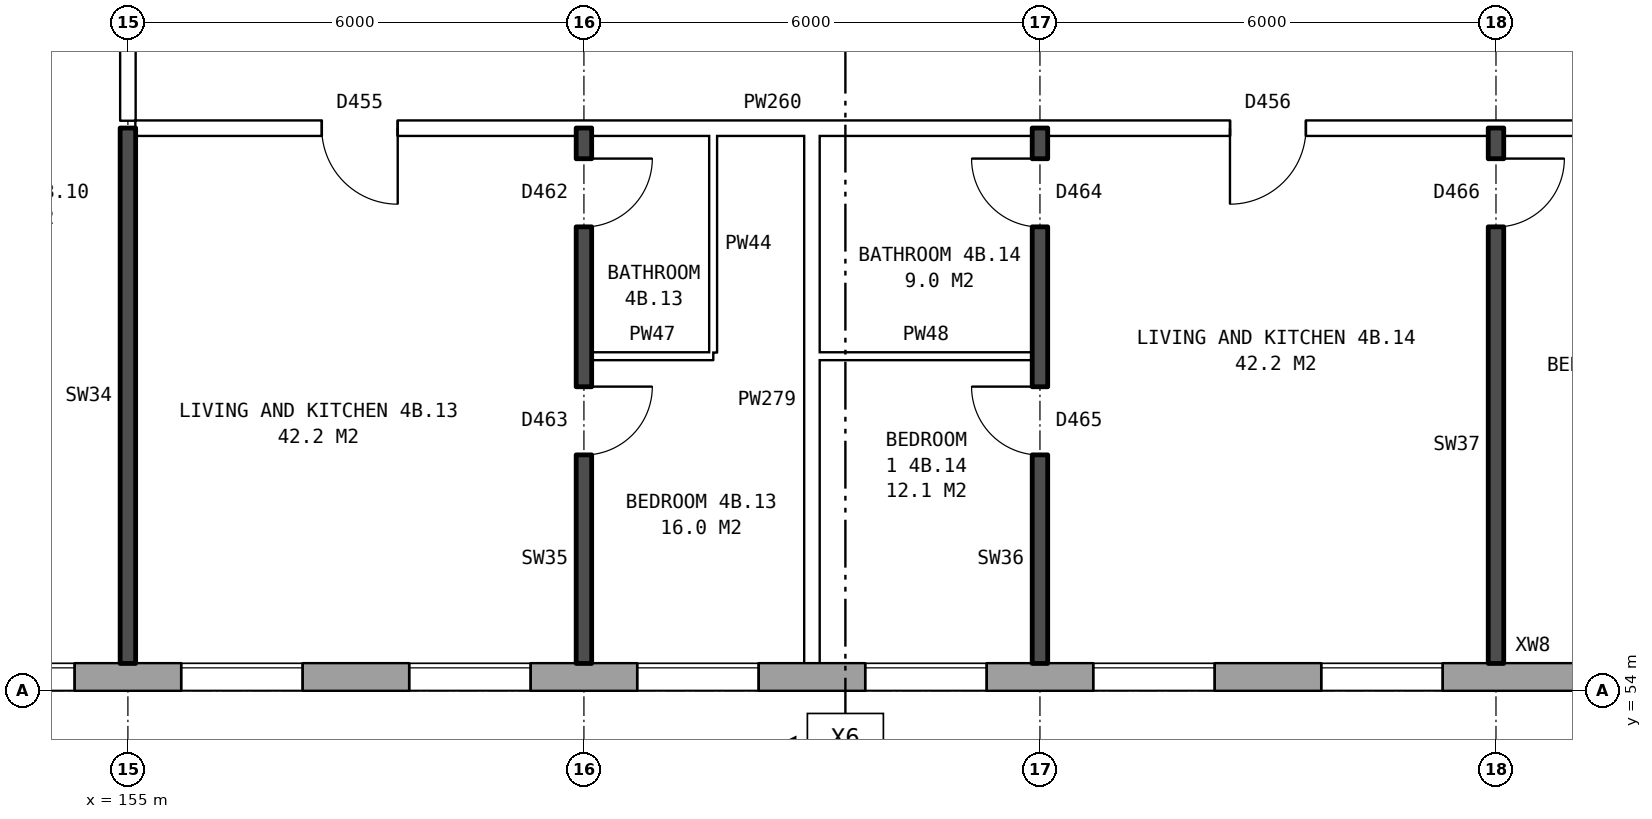
"""IFC4 building model, lengths in metres.
Left out: names, types, materials, properties, quantities, classifications, styles, units other than length and angle.
Written with IfcOpenShell. Run it as: python <this file> out.ifc"""

import sys

from ifc_helpers import new_model, si_unit, direction, frame, frame_2d, origin, place, context, subcontext, project, spatial, rectangle, extrude, element, fill, save


model = new_model("IFC4")
c1 = context("Model", 3, precision=1e-05, world=origin(), true_north=direction((0.0, 1.0)))
c2 = subcontext(c1, "Body", "Model", "MODEL_VIEW")
j1 = project(units=[si_unit("LENGTHUNIT", "METRE"), si_unit("PLANEANGLEUNIT", "RADIAN")], contexts=[c1])
p1 = place(None, origin())
s1 = spatial("IfcSite", under=j1, at=p1, CompositionType="ELEMENT")
p2 = place(p1, origin())
s2 = spatial("IfcBuilding", under=s1, at=p2, CompositionType="ELEMENT")
p3 = place(p2, frame((0.0, 0.0, 19.5)))
s3 = spatial("IfcBuildingStorey", under=s2, at=p3, CompositionType="ELEMENT", Elevation=19.5)
p4 = place(p3, frame((134.075, 54.18, 0.0), z_axis=(0.0, 0.0, 1.0), x_axis=(1.0, 0.0, 0.0)))
e1 = element("IfcWall", 1, at=p4, inside=s3, PredefinedType="STANDARD", context=c2, shape_type="SweptSolid", body=[
    extrude(rectangle(XDim=40.601, YDim=0.36, at=frame_2d((20.3, 0.0))), origin(), (0.0, 0.0, 1.0), 2.85),
])
p5 = place(p4, frame((0.3, 0.0, 0.8)))
e2 = element("IfcOpeningElement", 2, at=p5, cuts=e1, PredefinedType="OPENING", context=c2, shape_type="SweptSolid", body=[
    extrude(rectangle(XDim=0.8, YDim=0.9, at=frame_2d((0.4, 0.45))), frame((0.0, 0.19, 0.0), z_axis=(0.0, -1.0, 0.0), x_axis=(1.0, 0.0, 0.0)), (0.0, 0.0, 1.0), 0.38),
])
p6 = place(p4, frame((3.625, 0.0, 0.8)))
e3 = element("IfcOpeningElement", 3, at=p6, cuts=e1, PredefinedType="OPENING", context=c2, shape_type="SweptSolid", body=[
    extrude(rectangle(XDim=1.6, YDim=1.8, at=frame_2d((0.8, 0.9))), frame((0.0, 0.19, 0.0), z_axis=(0.0, -1.0, 0.0), x_axis=(1.0, 0.0, 0.0)), (0.0, 0.0, 1.0), 0.38),
])
p7 = place(p4, frame((6.625, 0.0, 0.8)))
e4 = element("IfcOpeningElement", 4, at=p7, cuts=e1, PredefinedType="OPENING", context=c2, shape_type="SweptSolid", body=[
    extrude(rectangle(XDim=1.6, YDim=1.8, at=frame_2d((0.8, 0.9))), frame((0.0, 0.19, 0.0), z_axis=(0.0, -1.0, 0.0), x_axis=(1.0, 0.0, 0.0)), (0.0, 0.0, 1.0), 0.38),
])
p8 = place(p4, frame((9.625, 0.0, 0.8)))
e5 = element("IfcOpeningElement", 5, at=p8, cuts=e1, PredefinedType="OPENING", context=c2, shape_type="SweptSolid", body=[
    extrude(rectangle(XDim=1.6, YDim=1.8, at=frame_2d((0.8, 0.9))), frame((0.0, 0.19, 0.0), z_axis=(0.0, -1.0, 0.0), x_axis=(1.0, 0.0, 0.0)), (0.0, 0.0, 1.0), 0.38),
])
p9 = place(p4, frame((12.625, 0.0, 0.8)))
e6 = element("IfcOpeningElement", 6, at=p9, cuts=e1, PredefinedType="OPENING", context=c2, shape_type="SweptSolid", body=[
    extrude(rectangle(XDim=1.6, YDim=1.8, at=frame_2d((0.8, 0.9))), frame((0.0, 0.19, 0.0), z_axis=(0.0, -1.0, 0.0), x_axis=(1.0, 0.0, 0.0)), (0.0, 0.0, 1.0), 0.38),
])
p10 = place(p4, frame((15.625, 0.0, 0.8)))
e7 = element("IfcOpeningElement", 7, at=p10, cuts=e1, PredefinedType="OPENING", context=c2, shape_type="SweptSolid", body=[
    extrude(rectangle(XDim=1.6, YDim=1.8, at=frame_2d((0.8, 0.9))), frame((0.0, 0.19, 0.0), z_axis=(0.0, -1.0, 0.0), x_axis=(1.0, 0.0, 0.0)), (0.0, 0.0, 1.0), 0.38),
])
p11 = place(p4, frame((18.625, 0.0, 0.8)))
e8 = element("IfcOpeningElement", 8, at=p11, cuts=e1, PredefinedType="OPENING", context=c2, shape_type="SweptSolid", body=[
    extrude(rectangle(XDim=1.6, YDim=1.8, at=frame_2d((0.8, 0.9))), frame((0.0, 0.19, 0.0), z_axis=(0.0, -1.0, 0.0), x_axis=(1.0, 0.0, 0.0)), (0.0, 0.0, 1.0), 0.38),
])
p12 = place(p4, frame((21.625, 0.0, 0.8)))
e9 = element("IfcOpeningElement", 9, at=p12, cuts=e1, PredefinedType="OPENING", context=c2, shape_type="SweptSolid", body=[
    extrude(rectangle(XDim=1.6, YDim=1.8, at=frame_2d((0.8, 0.9))), frame((0.0, 0.19, 0.0), z_axis=(0.0, -1.0, 0.0), x_axis=(1.0, 0.0, 0.0)), (0.0, 0.0, 1.0), 0.38),
])
p13 = place(p4, frame((24.625, 0.0, 0.8)))
e10 = element("IfcOpeningElement", 10, at=p13, cuts=e1, PredefinedType="OPENING", context=c2, shape_type="SweptSolid", body=[
    extrude(rectangle(XDim=1.6, YDim=1.8, at=frame_2d((0.8, 0.9))), frame((0.0, 0.19, 0.0), z_axis=(0.0, -1.0, 0.0), x_axis=(1.0, 0.0, 0.0)), (0.0, 0.0, 1.0), 0.38),
])
p14 = place(p4, frame((27.625, 0.0, 0.8)))
e11 = element("IfcOpeningElement", 11, at=p14, cuts=e1, PredefinedType="OPENING", context=c2, shape_type="SweptSolid", body=[
    extrude(rectangle(XDim=1.6, YDim=1.8, at=frame_2d((0.8, 0.9))), frame((0.0, 0.19, 0.0), z_axis=(0.0, -1.0, 0.0), x_axis=(1.0, 0.0, 0.0)), (0.0, 0.0, 1.0), 0.38),
])
p15 = place(p4, frame((30.625, 0.0, 0.8)))
e12 = element("IfcOpeningElement", 12, at=p15, cuts=e1, PredefinedType="OPENING", context=c2, shape_type="SweptSolid", body=[
    extrude(rectangle(XDim=1.6, YDim=1.8, at=frame_2d((0.8, 0.9))), frame((0.0, 0.19, 0.0), z_axis=(0.0, -1.0, 0.0), x_axis=(1.0, 0.0, 0.0)), (0.0, 0.0, 1.0), 0.38),
])
p16 = place(p4, frame((33.625, 0.0, 0.8)))
e13 = element("IfcOpeningElement", 13, at=p16, cuts=e1, PredefinedType="OPENING", context=c2, shape_type="SweptSolid", body=[
    extrude(rectangle(XDim=1.6, YDim=1.8, at=frame_2d((0.8, 0.9))), frame((0.0, 0.19, 0.0), z_axis=(0.0, -1.0, 0.0), x_axis=(1.0, 0.0, 0.0)), (0.0, 0.0, 1.0), 0.38),
])
p17 = place(p4, frame((36.625, 0.0, 0.8)))
e14 = element("IfcOpeningElement", 14, at=p17, cuts=e1, PredefinedType="OPENING", context=c2, shape_type="SweptSolid", body=[
    extrude(rectangle(XDim=1.6, YDim=1.8, at=frame_2d((0.8, 0.9))), frame((0.0, 0.19, 0.0), z_axis=(0.0, -1.0, 0.0), x_axis=(1.0, 0.0, 0.0)), (0.0, 0.0, 1.0), 0.38),
])
p18 = place(p4, frame((1.4, 0.0, 0.8)))
e15 = element("IfcOpeningElement", 15, at=p18, cuts=e1, PredefinedType="OPENING", context=c2, shape_type="SweptSolid", body=[
    extrude(rectangle(XDim=1.2, YDim=1.8, at=frame_2d((0.6, 0.9))), frame((0.0, 0.19, 0.0), z_axis=(0.0, -1.0, 0.0), x_axis=(1.0, 0.0, 0.0)), (0.0, 0.0, 1.0), 0.38),
])
p19 = place(p3, frame((161.1, 58.4, 0.0), z_axis=(0.0, 0.0, 1.0), x_axis=(1.0, 0.0, 0.0)))
e16 = element("IfcWall", 16, at=p19, inside=s3, PredefinedType="PARTITIONING", context=c2, shape_type="SweptSolid", body=[
    extrude(rectangle(XDim=1.6, YDim=0.1, at=frame_2d((0.8, 0.0))), origin(), (0.0, 0.0, 1.0), 2.85),
])
p20 = place(p3, frame((164.1, 58.4, 0.0), z_axis=(0.0, 0.0, 1.0), x_axis=(1.0, 0.0, 0.0)))
e17 = element("IfcWall", 17, at=p20, inside=s3, PredefinedType="PARTITIONING", context=c2, shape_type="SweptSolid", body=[
    extrude(rectangle(XDim=2.8, YDim=0.1, at=frame_2d((1.4, 0.0))), origin(), (0.0, 0.0, 1.0), 2.85),
])
p21 = place(p3, frame((155.1, 61.4, 0.0), z_axis=(0.0, 0.0, 1.0), x_axis=(1.0, 0.0, 0.0)))
e18 = element("IfcWall", 18, at=p21, inside=s3, PredefinedType="PARTITIONING", context=c2, shape_type="SweptSolid", body=[
    extrude(rectangle(XDim=22.29, YDim=0.2, at=frame_2d((11.145, 0.0))), origin(), (0.0, 0.0, 1.0), 2.85),
])
p22 = place(p21, frame((2.45, 0.0, 0.0)))
e19 = element("IfcOpeningElement", 19, at=p22, cuts=e18, PredefinedType="OPENING", context=c2, shape_type="SweptSolid", body=[
    extrude(rectangle(XDim=1.0, YDim=2.1, at=frame_2d((0.5, 1.05))), frame((0.0, 0.11, 0.0), z_axis=(0.0, -1.0, 0.0), x_axis=(1.0, 0.0, 0.0)), (0.0, 0.0, 1.0), 0.22),
])
p23 = place(p21, frame((14.4, 0.0, 0.0)))
e20 = element("IfcOpeningElement", 20, at=p23, cuts=e18, PredefinedType="OPENING", context=c2, shape_type="SweptSolid", body=[
    extrude(rectangle(XDim=1.0, YDim=2.1, at=frame_2d((0.5, 1.05))), frame((0.0, 0.11, 0.0), z_axis=(0.0, -1.0, 0.0), x_axis=(1.0, 0.0, 0.0)), (0.0, 0.0, 1.0), 0.22),
])
p24 = place(p3, frame((155.0, 54.36, 0.0), z_axis=(0.0, 0.0, 1.0), x_axis=(0.0, 1.0, 0.0)))
e21 = element("IfcWall", 21, at=p24, inside=s3, PredefinedType="SOLIDWALL", context=c2, shape_type="SweptSolid", body=[
    extrude(rectangle(XDim=7.04, YDim=0.2, at=frame_2d((3.52, 0.0))), origin(), (0.0, 0.0, 1.0), 2.85),
])
p25 = place(p3, frame((155.0, 61.5, 0.0), z_axis=(0.0, 0.0, 1.0), x_axis=(0.0, 1.0, 0.0)))
e22 = element("IfcWall", 22, at=p25, inside=s3, PredefinedType="PARTITIONING", context=c2, shape_type="SweptSolid", body=[
    extrude(rectangle(XDim=2.2, YDim=0.2, at=frame_2d((1.1, 0.0))), origin(), (0.0, 0.0, 1.0), 2.85),
])
p26 = place(p3, frame((161.0, 54.36, 0.0), z_axis=(0.0, 0.0, 1.0), x_axis=(0.0, 1.0, 0.0)))
e23 = element("IfcWall", 23, at=p26, inside=s3, PredefinedType="SOLIDWALL", context=c2, shape_type="SweptSolid", body=[
    extrude(rectangle(XDim=7.04, YDim=0.2, at=frame_2d((3.52, 0.0))), origin(), (0.0, 0.0, 1.0), 2.85),
])
p27 = place(p26, frame((2.74, 0.0, 0.0)))
e24 = element("IfcOpeningElement", 24, at=p27, cuts=e23, PredefinedType="OPENING", context=c2, shape_type="SweptSolid", body=[
    extrude(rectangle(XDim=0.9, YDim=2.1, at=frame_2d((0.45, 1.05))), frame((0.0, 0.11, 0.0), z_axis=(0.0, -1.0, 0.0), x_axis=(1.0, 0.0, 0.0)), (0.0, 0.0, 1.0), 0.22),
])
p28 = place(p26, frame((5.74, 0.0, 0.0)))
e25 = element("IfcOpeningElement", 25, at=p28, cuts=e23, PredefinedType="OPENING", context=c2, shape_type="SweptSolid", body=[
    extrude(rectangle(XDim=0.9, YDim=2.1, at=frame_2d((0.45, 1.05))), frame((0.0, 0.11, 0.0), z_axis=(0.0, -1.0, 0.0), x_axis=(1.0, 0.0, 0.0)), (0.0, 0.0, 1.0), 0.22),
])
p29 = place(p3, frame((162.7, 58.45, 0.0), z_axis=(0.0, 0.0, 1.0), x_axis=(0.0, 1.0, 0.0)))
e26 = element("IfcWall", 26, at=p29, inside=s3, PredefinedType="PARTITIONING", context=c2, shape_type="SweptSolid", body=[
    extrude(rectangle(XDim=2.85, YDim=0.1, at=frame_2d((1.425, 0.0))), origin(), (0.0, 0.0, 1.0), 2.85),
])
p30 = place(p3, frame((164.0, 54.36, 0.0), z_axis=(0.0, 0.0, 1.0), x_axis=(0.0, 1.0, 0.0)))
e27 = element("IfcWall", 27, at=p30, inside=s3, PredefinedType="PARTITIONING", context=c2, shape_type="SweptSolid", body=[
    extrude(rectangle(XDim=6.94, YDim=0.2, at=frame_2d((3.47, 0.0))), origin(), (0.0, 0.0, 1.0), 2.85),
])
p31 = place(p3, frame((167.0, 54.36, 0.0), z_axis=(0.0, 0.0, 1.0), x_axis=(0.0, 1.0, 0.0)))
e28 = element("IfcWall", 28, at=p31, inside=s3, PredefinedType="SOLIDWALL", context=c2, shape_type="SweptSolid", body=[
    extrude(rectangle(XDim=7.04, YDim=0.2, at=frame_2d((3.52, 0.0))), origin(), (0.0, 0.0, 1.0), 2.85),
])
p32 = place(p31, frame((2.74, 0.0, 0.0)))
e29 = element("IfcOpeningElement", 29, at=p32, cuts=e28, PredefinedType="OPENING", context=c2, shape_type="SweptSolid", body=[
    extrude(rectangle(XDim=0.9, YDim=2.1, at=frame_2d((0.45, 1.05))), frame((0.0, 0.11, 0.0), z_axis=(0.0, -1.0, 0.0), x_axis=(1.0, 0.0, 0.0)), (0.0, 0.0, 1.0), 0.22),
])
p33 = place(p31, frame((5.74, 0.0, 0.0)))
e30 = element("IfcOpeningElement", 30, at=p33, cuts=e28, PredefinedType="OPENING", context=c2, shape_type="SweptSolid", body=[
    extrude(rectangle(XDim=0.9, YDim=2.1, at=frame_2d((0.45, 1.05))), frame((0.0, 0.11, 0.0), z_axis=(0.0, -1.0, 0.0), x_axis=(1.0, 0.0, 0.0)), (0.0, 0.0, 1.0), 0.22),
])
p34 = place(p3, frame((173.0, 54.36, 0.0), z_axis=(0.0, 0.0, 1.0), x_axis=(0.0, 1.0, 0.0)))
e31 = element("IfcWall", 31, at=p34, inside=s3, PredefinedType="SOLIDWALL", context=c2, shape_type="SweptSolid", body=[
    extrude(rectangle(XDim=7.04, YDim=0.2, at=frame_2d((3.52, 0.0))), origin(), (0.0, 0.0, 1.0), 2.85),
])
p35 = place(p34, frame((5.74, 0.0, 0.0)))
e32 = element("IfcOpeningElement", 32, at=p35, cuts=e31, PredefinedType="OPENING", context=c2, shape_type="SweptSolid", body=[
    extrude(rectangle(XDim=0.9, YDim=2.1, at=frame_2d((0.45, 1.05))), frame((0.0, 0.11, 0.0), z_axis=(0.0, -1.0, 0.0), x_axis=(1.0, 0.0, 0.0)), (0.0, 0.0, 1.0), 0.22),
])
p36 = place(p11, origin())
e33 = element("IfcWindow", 33, at=p36, inside=s3, PartitioningType="SINGLE_PANEL", PredefinedType="WINDOW", context=c2, shape_type="SweptSolid", body=[
    extrude(rectangle(XDim=1.6, YDim=1.8, at=frame_2d((0.8, 0.9))), frame((0.0, 0.15, 0.0), z_axis=(0.0, -1.0, 0.0), x_axis=(1.0, 0.0, 0.0)), (0.0, 0.0, 1.0), 0.06),
])
fill(e8, e33)
p37 = place(p12, origin())
e34 = element("IfcWindow", 34, at=p37, inside=s3, PartitioningType="SINGLE_PANEL", PredefinedType="WINDOW", context=c2, shape_type="SweptSolid", body=[
    extrude(rectangle(XDim=1.6, YDim=1.8, at=frame_2d((0.8, 0.9))), frame((0.0, 0.15, 0.0), z_axis=(0.0, -1.0, 0.0), x_axis=(1.0, 0.0, 0.0)), (0.0, 0.0, 1.0), 0.06),
])
fill(e9, e34)
p38 = place(p13, origin())
e35 = element("IfcWindow", 35, at=p38, inside=s3, PartitioningType="SINGLE_PANEL", PredefinedType="WINDOW", context=c2, shape_type="SweptSolid", body=[
    extrude(rectangle(XDim=1.6, YDim=1.8, at=frame_2d((0.8, 0.9))), frame((0.0, 0.15, 0.0), z_axis=(0.0, -1.0, 0.0), x_axis=(1.0, 0.0, 0.0)), (0.0, 0.0, 1.0), 0.06),
])
fill(e10, e35)
p39 = place(p14, origin())
e36 = element("IfcWindow", 36, at=p39, inside=s3, PartitioningType="SINGLE_PANEL", PredefinedType="WINDOW", context=c2, shape_type="SweptSolid", body=[
    extrude(rectangle(XDim=1.6, YDim=1.8, at=frame_2d((0.8, 0.9))), frame((0.0, 0.15, 0.0), z_axis=(0.0, -1.0, 0.0), x_axis=(1.0, 0.0, 0.0)), (0.0, 0.0, 1.0), 0.06),
])
fill(e11, e36)
p40 = place(p15, origin())
e37 = element("IfcWindow", 37, at=p40, inside=s3, PartitioningType="SINGLE_PANEL", PredefinedType="WINDOW", context=c2, shape_type="SweptSolid", body=[
    extrude(rectangle(XDim=1.6, YDim=1.8, at=frame_2d((0.8, 0.9))), frame((0.0, 0.15, 0.0), z_axis=(0.0, -1.0, 0.0), x_axis=(1.0, 0.0, 0.0)), (0.0, 0.0, 1.0), 0.06),
])
fill(e12, e37)
p41 = place(p16, origin())
e38 = element("IfcWindow", 38, at=p41, inside=s3, PartitioningType="SINGLE_PANEL", PredefinedType="WINDOW", context=c2, shape_type="SweptSolid", body=[
    extrude(rectangle(XDim=1.6, YDim=1.8, at=frame_2d((0.8, 0.9))), frame((0.0, 0.15, 0.0), z_axis=(0.0, -1.0, 0.0), x_axis=(1.0, 0.0, 0.0)), (0.0, 0.0, 1.0), 0.06),
])
fill(e13, e38)
p42 = place(p17, origin())
e39 = element("IfcWindow", 39, at=p42, inside=s3, PartitioningType="SINGLE_PANEL", PredefinedType="WINDOW", context=c2, shape_type="SweptSolid", body=[
    extrude(rectangle(XDim=1.6, YDim=1.8, at=frame_2d((0.8, 0.9))), frame((0.0, 0.15, 0.0), z_axis=(0.0, -1.0, 0.0), x_axis=(1.0, 0.0, 0.0)), (0.0, 0.0, 1.0), 0.06),
])
fill(e14, e39)
p43 = place(p27, frame((0.9, 0.0, 0.0), z_axis=(0.0, 0.0, 1.0), x_axis=(-1.0, 0.0, 0.0)))
e40 = element("IfcDoor", 40, at=p43, inside=s3, OperationType="SINGLE_SWING_LEFT", PredefinedType="DOOR", context=c2, shape_type="SweptSolid", body=[
    extrude(rectangle(XDim=0.9, YDim=2.1, at=frame_2d((0.45, 1.05))), frame((0.0, 0.025, 0.0), z_axis=(0.0, -1.0, 0.0), x_axis=(1.0, 0.0, 0.0)), (0.0, 0.0, 1.0), 0.05),
])
fill(e24, e40)
p44 = place(p22, frame((1.0, 0.0, 0.0), z_axis=(0.0, 0.0, 1.0), x_axis=(-1.0, 0.0, 0.0)))
e41 = element("IfcDoor", 41, at=p44, inside=s3, OperationType="SINGLE_SWING_LEFT", PredefinedType="DOOR", context=c2, shape_type="SweptSolid", body=[
    extrude(rectangle(XDim=1.0, YDim=2.1, at=frame_2d((0.5, 1.05))), frame((0.0, 0.025, 0.0), z_axis=(0.0, -1.0, 0.0), x_axis=(1.0, 0.0, 0.0)), (0.0, 0.0, 1.0), 0.05),
])
fill(e19, e41)
p45 = place(p28, frame((0.9, 0.0, 0.0), z_axis=(0.0, 0.0, 1.0), x_axis=(-1.0, 0.0, 0.0)))
e42 = element("IfcDoor", 42, at=p45, inside=s3, OperationType="SINGLE_SWING_LEFT", PredefinedType="DOOR", context=c2, shape_type="SweptSolid", body=[
    extrude(rectangle(XDim=0.9, YDim=2.1, at=frame_2d((0.45, 1.05))), frame((0.0, 0.025, 0.0), z_axis=(0.0, -1.0, 0.0), x_axis=(1.0, 0.0, 0.0)), (0.0, 0.0, 1.0), 0.05),
])
fill(e25, e42)
p46 = place(p32, origin())
e43 = element("IfcDoor", 43, at=p46, inside=s3, OperationType="SINGLE_SWING_RIGHT", PredefinedType="DOOR", context=c2, shape_type="SweptSolid", body=[
    extrude(rectangle(XDim=0.9, YDim=2.1, at=frame_2d((0.45, 1.05))), frame((0.0, 0.025, 0.0), z_axis=(0.0, -1.0, 0.0), x_axis=(1.0, 0.0, 0.0)), (0.0, 0.0, 1.0), 0.05),
])
fill(e29, e43)
p47 = place(p35, frame((0.9, 0.0, 0.0), z_axis=(0.0, 0.0, 1.0), x_axis=(-1.0, 0.0, 0.0)))
e44 = element("IfcDoor", 44, at=p47, inside=s3, OperationType="SINGLE_SWING_LEFT", PredefinedType="DOOR", context=c2, shape_type="SweptSolid", body=[
    extrude(rectangle(XDim=0.9, YDim=2.1, at=frame_2d((0.45, 1.05))), frame((0.0, 0.025, 0.0), z_axis=(0.0, -1.0, 0.0), x_axis=(1.0, 0.0, 0.0)), (0.0, 0.0, 1.0), 0.05),
])
fill(e32, e44)
p48 = place(p23, frame((1.0, 0.0, 0.0), z_axis=(0.0, 0.0, 1.0), x_axis=(-1.0, 0.0, 0.0)))
e45 = element("IfcDoor", 45, at=p48, inside=s3, OperationType="SINGLE_SWING_RIGHT", PredefinedType="DOOR", context=c2, shape_type="SweptSolid", body=[
    extrude(rectangle(XDim=1.0, YDim=2.1, at=frame_2d((0.5, 1.05))), frame((0.0, 0.025, 0.0), z_axis=(0.0, -1.0, 0.0), x_axis=(1.0, 0.0, 0.0)), (0.0, 0.0, 1.0), 0.05),
])
fill(e20, e45)
p49 = place(p33, origin())
e46 = element("IfcDoor", 46, at=p49, inside=s3, OperationType="SINGLE_SWING_RIGHT", PredefinedType="DOOR", context=c2, shape_type="SweptSolid", body=[
    extrude(rectangle(XDim=0.9, YDim=2.1, at=frame_2d((0.45, 1.05))), frame((0.0, 0.025, 0.0), z_axis=(0.0, -1.0, 0.0), x_axis=(1.0, 0.0, 0.0)), (0.0, 0.0, 1.0), 0.05),
])
fill(e30, e46)
save(model, sys.argv[1])
